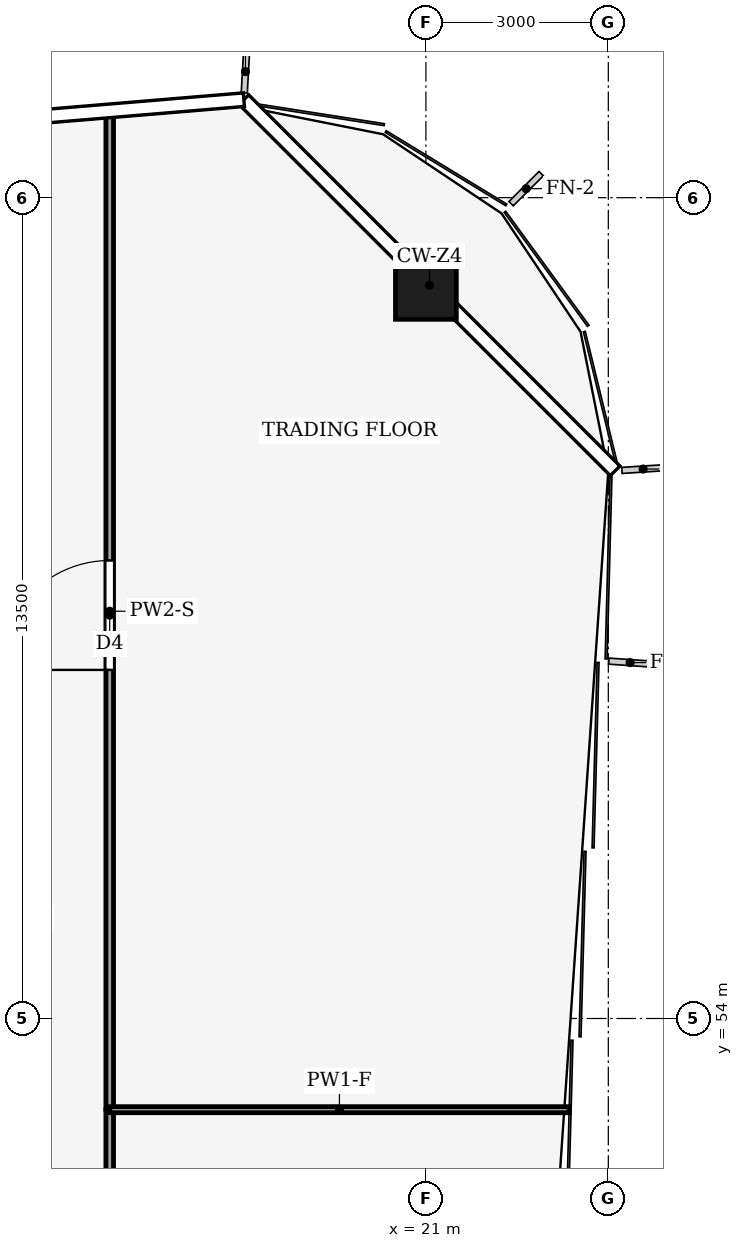
"""IFC4 building model, lengths in metres.
Left out: names, types, materials, properties, quantities, classifications, styles, units other than length and angle.
Written with IfcOpenShell. Run it as: python <this file> out.ifc"""

import sys

from ifc_helpers import new_model, si_unit, direction, frame, frame_2d, origin, origin_2d, place, context, subcontext, project, spatial, rectangle, hollow_rectangle, extrude, element, fill, save


model = new_model("IFC4")
c1 = context("Model", 3, precision=1e-05, world=origin(), true_north=direction((0.0, 1.0)))
c2 = subcontext(c1, "Body", "Model", "MODEL_VIEW")
j1 = project(units=[si_unit("LENGTHUNIT", "METRE"), si_unit("PLANEANGLEUNIT", "RADIAN")], contexts=[c1])
p1 = place(None, origin())
s1 = spatial("IfcSite", under=j1, at=p1, CompositionType="ELEMENT")
p2 = place(p1, origin())
s2 = spatial("IfcBuilding", under=s1, at=p2, CompositionType="ELEMENT")
p3 = place(p2, frame((0.0, 0.0, 250.0)))
s3 = spatial("IfcBuildingStorey", under=s2, at=p3, CompositionType="ELEMENT", Elevation=250.0)
p4 = place(p3, frame((21.0, 66.0, 0.0), z_axis=(0.0, 0.0, 1.0), x_axis=(1.0, 0.0, 0.0)))
e1 = element("IfcColumn", 1, at=p4, inside=s3, PredefinedType="COLUMN", context=c2, shape_type="SweptSolid", body=[
    extrude(hollow_rectangle(XDim=1.0, YDim=1.0, WallThickness=0.045, at=origin_2d()), origin(), (0.0, 0.0, 1.0), 4.0),
])
p5 = place(p3, frame((15.8, 40.5, 0.0), z_axis=(0.0, 0.0, 1.0), x_axis=(0.0, 1.0, 0.0)))
e2 = element("IfcWall", 2, at=p5, inside=s3, PredefinedType="PARTITIONING", context=c2, shape_type="SweptSolid", body=[
    extrude(rectangle(XDim=12.0, YDim=0.125, at=frame_2d((6.0, 0.0))), origin(), (0.0, 0.0, 1.0), 3.24),
])
p6 = place(p5, frame((5.1, 0.0, 0.0)))
e3 = element("IfcOpeningElement", 3, at=p6, cuts=e2, PredefinedType="OPENING", context=c2, shape_type="SweptSolid", body=[
    extrude(rectangle(XDim=1.8, YDim=2.1, at=frame_2d((0.9, 1.05))), frame((0.0, 0.073, 0.0), z_axis=(0.0, -1.0, 0.0), x_axis=(1.0, 0.0, 0.0)), (0.0, 0.0, 1.0), 0.145),
])
p7 = place(p3, frame((15.8, 52.5, 0.0), z_axis=(0.0, 0.0, 1.0), x_axis=(0.0, 1.0, 0.0)))
e4 = element("IfcWall", 4, at=p7, inside=s3, PredefinedType="PARTITIONING", context=c2, shape_type="SweptSolid", body=[
    extrude(rectangle(XDim=16.397, YDim=0.125, at=frame_2d((8.198, 0.0))), origin(), (0.0, 0.0, 1.0), 3.04),
])
p8 = place(p7, frame((7.233, 0.0, 0.0)))
e5 = element("IfcOpeningElement", 5, at=p8, cuts=e4, PredefinedType="OPENING", context=c2, shape_type="SweptSolid", body=[
    extrude(rectangle(XDim=1.8, YDim=2.1, at=frame_2d((0.9, 1.05))), frame((0.0, 0.073, 0.0), z_axis=(0.0, -1.0, 0.0), x_axis=(1.0, 0.0, 0.0)), (0.0, 0.0, 1.0), 0.145),
])
p9 = place(p3, frame((23.356, 52.5, 0.0), z_axis=(0.0, 0.0, 1.0), x_axis=(-1.0, 0.0, 0.0)))
e6 = element("IfcWall", 6, at=p9, inside=s3, PredefinedType="PARTITIONING", context=c2, shape_type="SweptSolid", body=[
    extrude(rectangle(XDim=7.556, YDim=0.1, at=frame_2d((3.778, 0.0))), origin(), (0.0, 0.0, 1.0), 3.04),
])
p10 = place(p8, origin())
e7 = element("IfcDoor", 7, at=p10, inside=s3, OperationType="DOUBLE_DOOR_SINGLE_SWING", PredefinedType="DOOR", context=c2, shape_type="SweptSolid", body=[
    extrude(rectangle(XDim=1.8, YDim=2.1, at=frame_2d((0.9, 1.05))), frame((0.0, 0.025, 0.0), z_axis=(0.0, -1.0, 0.0), x_axis=(1.0, 0.0, 0.0)), (0.0, 0.0, 1.0), 0.05),
])
fill(e5, e7)
save(model, sys.argv[1])
